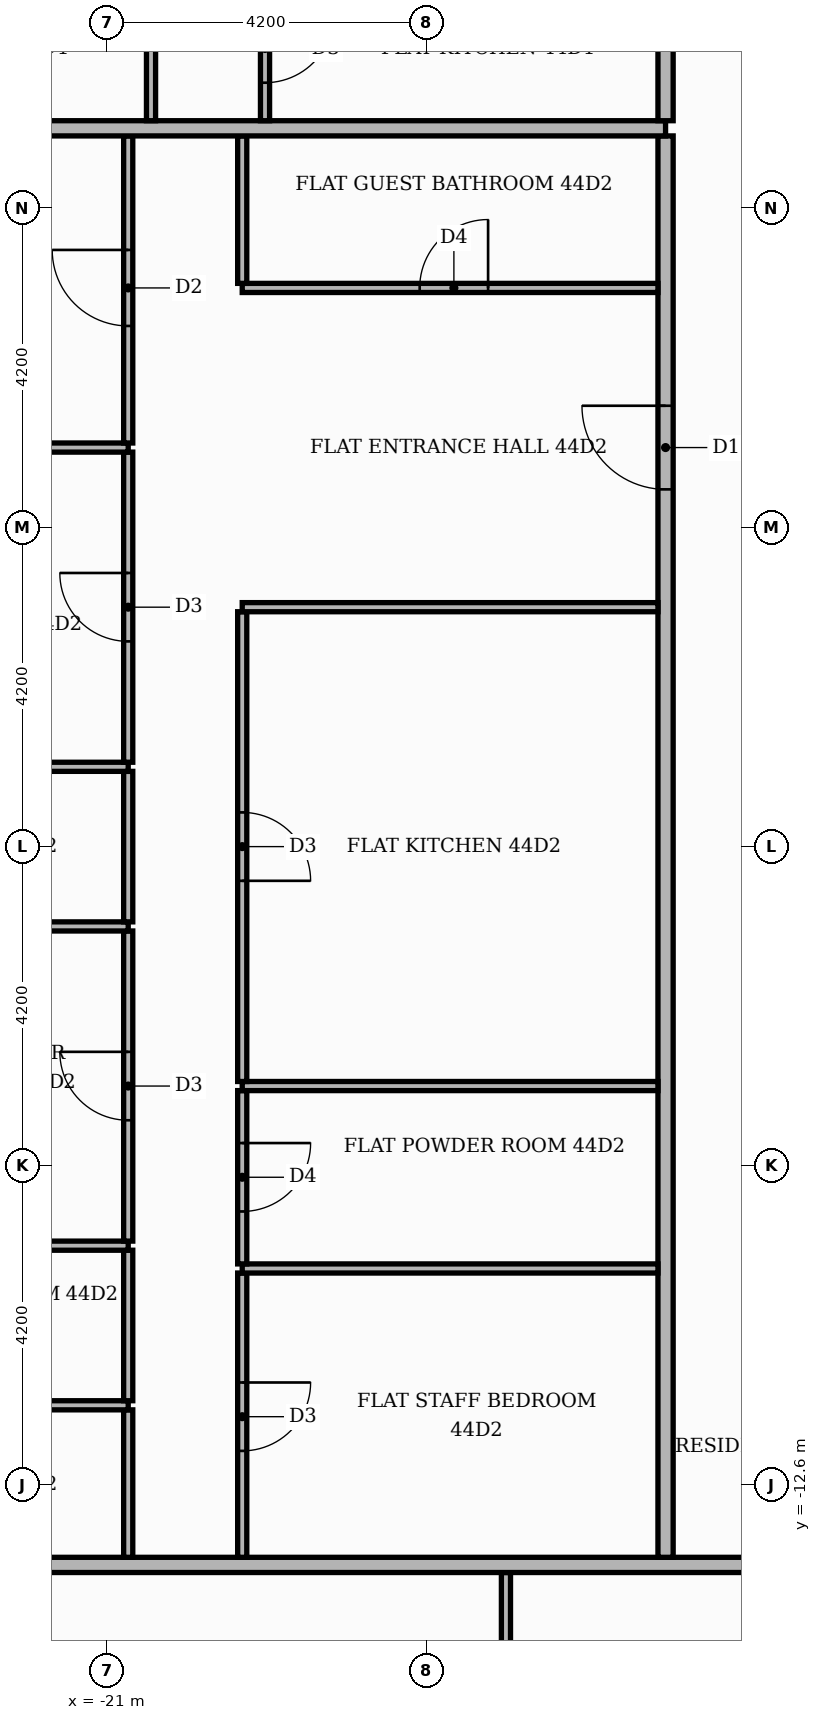
"""IFC4 building model, lengths in metres.
Left out: names, types, materials, properties, quantities, classifications, styles, units other than length and angle.
Written with IfcOpenShell. Run it as: python <this file> out.ifc"""

import sys

from ifc_helpers import new_model, si_unit, direction, frame, frame_2d, origin, place, context, subcontext, project, spatial, rectangle, extrude, element, fill, save


model = new_model("IFC4")
c1 = context("Model", 3, precision=1e-05, world=origin(), true_north=direction((0.0, 1.0)))
c2 = subcontext(c1, "Body", "Model", "MODEL_VIEW")
j1 = project(units=[si_unit("LENGTHUNIT", "METRE"), si_unit("PLANEANGLEUNIT", "RADIAN")], contexts=[c1])
p1 = place(None, origin())
s1 = spatial("IfcSite", under=j1, at=p1, CompositionType="ELEMENT")
p2 = place(p1, origin())
s2 = spatial("IfcBuilding", under=s1, at=p2, CompositionType="ELEMENT")
p3 = place(p2, frame((0.0, 0.0, 188.4)))
s3 = spatial("IfcBuildingStorey", under=s2, at=p3, CompositionType="ELEMENT", Elevation=188.4)
p4 = place(p3, frame((-15.75, -20.06, 0.0), z_axis=(0.0, 0.0, 1.0), x_axis=(0.0, 1.0, 0.0)))
e1 = element("IfcWall", 1, at=p4, inside=s3, PredefinedType="PARTITIONING", context=c2, shape_type="SweptSolid", body=[
    extrude(rectangle(XDim=6.31, YDim=0.12, at=frame_2d((3.155, 0.0))), origin(), (0.0, 0.0, 1.0), 3.48),
])
p5 = place(p4, frame((2.675, 0.0, 0.0)))
e2 = element("IfcOpeningElement", 2, at=p5, cuts=e1, PredefinedType="OPENING", context=c2, shape_type="SweptSolid", body=[
    extrude(rectangle(XDim=1.0, YDim=2.1, at=frame_2d((0.5, 1.05))), frame((0.0, 0.07, 0.0), z_axis=(0.0, -1.0, 0.0), x_axis=(1.0, 0.0, 0.0)), (0.0, 0.0, 1.0), 0.14),
])
p6 = place(p3, frame((-25.42, -13.65, 0.0), z_axis=(0.0, 0.0, 1.0), x_axis=(1.0, 0.0, 0.0)))
e3 = element("IfcWall", 3, at=p6, inside=s3, PredefinedType="PARTITIONING", context=c2, shape_type="SweptSolid", body=[
    extrude(rectangle(XDim=39.07, YDim=0.2, at=frame_2d((19.535, 0.0))), origin(), (0.0, 0.0, 1.0), 3.48),
])
p7 = place(p6, frame((13.32, 0.0, 0.0)))
e4 = element("IfcOpeningElement", 4, at=p7, cuts=e3, PredefinedType="OPENING", context=c2, shape_type="SweptSolid", body=[
    extrude(rectangle(XDim=1.1, YDim=2.4, at=frame_2d((0.55, 1.2))), frame((0.0, 0.11, 0.0), z_axis=(0.0, -1.0, 0.0), x_axis=(1.0, 0.0, 0.0)), (0.0, 0.0, 1.0), 0.22),
])
p8 = place(p6, frame((21.72, 0.0, 0.0)))
e5 = element("IfcOpeningElement", 5, at=p8, cuts=e3, PredefinedType="OPENING", context=c2, shape_type="SweptSolid", body=[
    extrude(rectangle(XDim=1.1, YDim=2.4, at=frame_2d((0.55, 1.2))), frame((0.0, 0.11, 0.0), z_axis=(0.0, -1.0, 0.0), x_axis=(1.0, 0.0, 0.0)), (0.0, 0.0, 1.0), 0.22),
])
p9 = place(p3, frame((-20.72, -13.55, 0.0), z_axis=(0.0, 0.0, 1.0), x_axis=(0.0, 1.0, 0.0)))
e6 = element("IfcWall", 6, at=p9, inside=s3, PredefinedType="PARTITIONING", context=c2, shape_type="SweptSolid", body=[
    extrude(rectangle(XDim=1.94, YDim=0.12, at=frame_2d((0.97, 0.0))), origin(), (0.0, 0.0, 1.0), 3.48),
])
p10 = place(p3, frame((-19.22, -13.55, 0.0), z_axis=(0.0, 0.0, 1.0), x_axis=(0.0, 1.0, 0.0)))
e7 = element("IfcWall", 7, at=p10, inside=s3, PredefinedType="PARTITIONING", context=c2, shape_type="SweptSolid", body=[
    extrude(rectangle(XDim=3.74, YDim=0.12, at=frame_2d((1.87, 0.0))), origin(), (0.0, 0.0, 1.0), 3.48),
])
p11 = place(p10, frame((1.4, 0.0, 0.0)))
e8 = element("IfcOpeningElement", 8, at=p11, cuts=e7, PredefinedType="OPENING", context=c2, shape_type="SweptSolid", body=[
    extrude(rectangle(XDim=0.9, YDim=2.1, at=frame_2d((0.45, 1.05))), frame((0.0, 0.07, 0.0), z_axis=(0.0, -1.0, 0.0), x_axis=(1.0, 0.0, 0.0)), (0.0, 0.0, 1.0), 0.14),
])
p12 = place(p3, frame((-13.65, -13.55, 0.0), z_axis=(0.0, 0.0, 1.0), x_axis=(0.0, 1.0, 0.0)))
e9 = element("IfcWall", 9, at=p12, inside=s3, PredefinedType="PARTITIONING", context=c2, shape_type="SweptSolid", body=[
    extrude(rectangle(XDim=18.7, YDim=0.2, at=frame_2d((9.35, 0.0))), origin(), (0.0, 0.0, 1.0), 3.48),
])
p13 = place(p12, frame((14.05, 0.0, 0.0)))
e10 = element("IfcOpeningElement", 10, at=p13, cuts=e9, PredefinedType="OPENING", context=c2, shape_type="SweptSolid", body=[
    extrude(rectangle(XDim=1.1, YDim=2.4, at=frame_2d((0.55, 1.2))), frame((0.0, 0.11, 0.0), z_axis=(0.0, -1.0, 0.0), x_axis=(1.0, 0.0, 0.0)), (0.0, 0.0, 1.0), 0.22),
])
p14 = place(p3, frame((-25.42, -11.55, 0.0), z_axis=(0.0, 0.0, 1.0), x_axis=(1.0, 0.0, 0.0)))
e11 = element("IfcWall", 11, at=p14, inside=s3, PredefinedType="PARTITIONING", context=c2, shape_type="SweptSolid", body=[
    extrude(rectangle(XDim=4.7, YDim=0.12, at=frame_2d((2.35, 0.0))), origin(), (0.0, 0.0, 1.0), 3.48),
])
p15 = place(p14, frame((1.75, 0.0, 0.0)))
e12 = element("IfcOpeningElement", 12, at=p15, cuts=e11, PredefinedType="OPENING", context=c2, shape_type="SweptSolid", body=[
    extrude(rectangle(XDim=0.9, YDim=2.1, at=frame_2d((0.45, 1.05))), frame((0.0, 0.07, 0.0), z_axis=(0.0, -1.0, 0.0), x_axis=(1.0, 0.0, 0.0)), (0.0, 0.0, 1.0), 0.14),
])
p16 = place(p3, frame((-20.72, -11.49, 0.0), z_axis=(0.0, 0.0, 1.0), x_axis=(0.0, 1.0, 0.0)))
e13 = element("IfcWall", 13, at=p16, inside=s3, PredefinedType="PARTITIONING", context=c2, shape_type="SweptSolid", body=[
    extrude(rectangle(XDim=1.98, YDim=0.12, at=frame_2d((0.99, 0.0))), origin(), (0.0, 0.0, 1.0), 3.48),
])
p17 = place(p3, frame((-19.22, -9.75, 0.0), z_axis=(0.0, 0.0, 1.0), x_axis=(1.0, 0.0, 0.0)))
e14 = element("IfcWall", 14, at=p17, inside=s3, PredefinedType="PARTITIONING", context=c2, shape_type="SweptSolid", body=[
    extrude(rectangle(XDim=5.47, YDim=0.12, at=frame_2d((2.735, 0.0))), origin(), (0.0, 0.0, 1.0), 3.48),
])
p18 = place(p3, frame((-19.22, -9.69, 0.0), z_axis=(0.0, 0.0, 1.0), x_axis=(0.0, 1.0, 0.0)))
e15 = element("IfcWall", 15, at=p18, inside=s3, PredefinedType="PARTITIONING", context=c2, shape_type="SweptSolid", body=[
    extrude(rectangle(XDim=2.28, YDim=0.12, at=frame_2d((1.14, 0.0))), origin(), (0.0, 0.0, 1.0), 3.48),
])
p19 = place(p18, frame((0.69, 0.0, 0.0)))
e16 = element("IfcOpeningElement", 16, at=p19, cuts=e15, PredefinedType="OPENING", context=c2, shape_type="SweptSolid", body=[
    extrude(rectangle(XDim=0.9, YDim=2.1, at=frame_2d((0.45, 1.05))), frame((0.0, 0.07, 0.0), z_axis=(0.0, -1.0, 0.0), x_axis=(1.0, 0.0, 0.0)), (0.0, 0.0, 1.0), 0.14),
])
p20 = place(p3, frame((-25.42, -9.45, 0.0), z_axis=(0.0, 0.0, 1.0), x_axis=(1.0, 0.0, 0.0)))
e17 = element("IfcWall", 17, at=p20, inside=s3, PredefinedType="PARTITIONING", context=c2, shape_type="SweptSolid", body=[
    extrude(rectangle(XDim=4.7, YDim=0.12, at=frame_2d((2.35, 0.0))), origin(), (0.0, 0.0, 1.0), 3.48),
])
p21 = place(p20, frame((1.75, 0.0, 0.0)))
e18 = element("IfcOpeningElement", 18, at=p21, cuts=e17, PredefinedType="OPENING", context=c2, shape_type="SweptSolid", body=[
    extrude(rectangle(XDim=0.9, YDim=2.1, at=frame_2d((0.45, 1.05))), frame((0.0, 0.07, 0.0), z_axis=(0.0, -1.0, 0.0), x_axis=(1.0, 0.0, 0.0)), (0.0, 0.0, 1.0), 0.14),
])
p22 = place(p3, frame((-20.72, -9.39, 0.0), z_axis=(0.0, 0.0, 1.0), x_axis=(0.0, 1.0, 0.0)))
e19 = element("IfcWall", 19, at=p22, inside=s3, PredefinedType="PARTITIONING", context=c2, shape_type="SweptSolid", body=[
    extrude(rectangle(XDim=4.08, YDim=0.12, at=frame_2d((2.04, 0.0))), origin(), (0.0, 0.0, 1.0), 3.48),
])
p23 = place(p22, frame((1.59, 0.0, 0.0)))
e20 = element("IfcOpeningElement", 20, at=p23, cuts=e19, PredefinedType="OPENING", context=c2, shape_type="SweptSolid", body=[
    extrude(rectangle(XDim=0.9, YDim=2.1, at=frame_2d((0.45, 1.05))), frame((0.0, 0.07, 0.0), z_axis=(0.0, -1.0, 0.0), x_axis=(1.0, 0.0, 0.0)), (0.0, 0.0, 1.0), 0.14),
])
p24 = place(p3, frame((-19.22, -7.35, 0.0), z_axis=(0.0, 0.0, 1.0), x_axis=(1.0, 0.0, 0.0)))
e21 = element("IfcWall", 21, at=p24, inside=s3, PredefinedType="PARTITIONING", context=c2, shape_type="SweptSolid", body=[
    extrude(rectangle(XDim=5.47, YDim=0.12, at=frame_2d((2.735, 0.0))), origin(), (0.0, 0.0, 1.0), 3.48),
])
p25 = place(p3, frame((-19.22, -7.29, 0.0), z_axis=(0.0, 0.0, 1.0), x_axis=(0.0, 1.0, 0.0)))
e22 = element("IfcWall", 22, at=p25, inside=s3, PredefinedType="PARTITIONING", context=c2, shape_type="SweptSolid", body=[
    extrude(rectangle(XDim=6.18, YDim=0.12, at=frame_2d((3.09, 0.0))), origin(), (0.0, 0.0, 1.0), 3.48),
])
p26 = place(p25, frame((2.64, 0.0, 0.0)))
e23 = element("IfcOpeningElement", 23, at=p26, cuts=e22, PredefinedType="OPENING", context=c2, shape_type="SweptSolid", body=[
    extrude(rectangle(XDim=0.9, YDim=2.1, at=frame_2d((0.45, 1.05))), frame((0.0, 0.07, 0.0), z_axis=(0.0, -1.0, 0.0), x_axis=(1.0, 0.0, 0.0)), (0.0, 0.0, 1.0), 0.14),
])
p27 = place(p3, frame((-25.42, -5.25, 0.0), z_axis=(0.0, 0.0, 1.0), x_axis=(1.0, 0.0, 0.0)))
e24 = element("IfcWall", 24, at=p27, inside=s3, PredefinedType="PARTITIONING", context=c2, shape_type="SweptSolid", body=[
    extrude(rectangle(XDim=4.7, YDim=0.12, at=frame_2d((2.35, 0.0))), origin(), (0.0, 0.0, 1.0), 3.48),
])
p28 = place(p3, frame((-20.72, -5.19, 0.0), z_axis=(0.0, 0.0, 1.0), x_axis=(0.0, 1.0, 0.0)))
e25 = element("IfcWall", 25, at=p28, inside=s3, PredefinedType="PARTITIONING", context=c2, shape_type="SweptSolid", body=[
    extrude(rectangle(XDim=1.98, YDim=0.12, at=frame_2d((0.99, 0.0))), origin(), (0.0, 0.0, 1.0), 3.48),
])
p29 = place(p3, frame((-25.42, -3.15, 0.0), z_axis=(0.0, 0.0, 1.0), x_axis=(1.0, 0.0, 0.0)))
e26 = element("IfcWall", 26, at=p29, inside=s3, PredefinedType="PARTITIONING", context=c2, shape_type="SweptSolid", body=[
    extrude(rectangle(XDim=4.7, YDim=0.12, at=frame_2d((2.35, 0.0))), origin(), (0.0, 0.0, 1.0), 3.48),
])
p30 = place(p29, frame((1.75, 0.0, 0.0)))
e27 = element("IfcOpeningElement", 27, at=p30, cuts=e26, PredefinedType="OPENING", context=c2, shape_type="SweptSolid", body=[
    extrude(rectangle(XDim=0.9, YDim=2.1, at=frame_2d((0.45, 1.05))), frame((0.0, 0.07, 0.0), z_axis=(0.0, -1.0, 0.0), x_axis=(1.0, 0.0, 0.0)), (0.0, 0.0, 1.0), 0.14),
])
p31 = place(p3, frame((-20.72, -3.09, 0.0), z_axis=(0.0, 0.0, 1.0), x_axis=(0.0, 1.0, 0.0)))
e28 = element("IfcWall", 28, at=p31, inside=s3, PredefinedType="PARTITIONING", context=c2, shape_type="SweptSolid", body=[
    extrude(rectangle(XDim=4.08, YDim=0.12, at=frame_2d((2.04, 0.0))), origin(), (0.0, 0.0, 1.0), 3.48),
])
p32 = place(p31, frame((1.59, 0.0, 0.0)))
e29 = element("IfcOpeningElement", 29, at=p32, cuts=e28, PredefinedType="OPENING", context=c2, shape_type="SweptSolid", body=[
    extrude(rectangle(XDim=0.9, YDim=2.1, at=frame_2d((0.45, 1.05))), frame((0.0, 0.07, 0.0), z_axis=(0.0, -1.0, 0.0), x_axis=(1.0, 0.0, 0.0)), (0.0, 0.0, 1.0), 0.14),
])
p33 = place(p3, frame((-19.22, -1.05, 0.0), z_axis=(0.0, 0.0, 1.0), x_axis=(1.0, 0.0, 0.0)))
e30 = element("IfcWall", 30, at=p33, inside=s3, PredefinedType="PARTITIONING", context=c2, shape_type="SweptSolid", body=[
    extrude(rectangle(XDim=5.47, YDim=0.12, at=frame_2d((2.735, 0.0))), origin(), (0.0, 0.0, 1.0), 3.48),
])
p34 = place(p3, frame((-25.42, 1.05, 0.0), z_axis=(0.0, 0.0, 1.0), x_axis=(1.0, 0.0, 0.0)))
e31 = element("IfcWall", 31, at=p34, inside=s3, PredefinedType="PARTITIONING", context=c2, shape_type="SweptSolid", body=[
    extrude(rectangle(XDim=4.7, YDim=0.12, at=frame_2d((2.35, 0.0))), origin(), (0.0, 0.0, 1.0), 3.48),
])
p35 = place(p3, frame((-20.72, 1.11, 0.0), z_axis=(0.0, 0.0, 1.0), x_axis=(0.0, 1.0, 0.0)))
e32 = element("IfcWall", 32, at=p35, inside=s3, PredefinedType="PARTITIONING", context=c2, shape_type="SweptSolid", body=[
    extrude(rectangle(XDim=4.04, YDim=0.12, at=frame_2d((2.02, 0.0))), origin(), (0.0, 0.0, 1.0), 3.48),
])
p36 = place(p35, frame((1.54, 0.0, 0.0)))
e33 = element("IfcOpeningElement", 33, at=p36, cuts=e32, PredefinedType="OPENING", context=c2, shape_type="SweptSolid", body=[
    extrude(rectangle(XDim=1.0, YDim=2.1, at=frame_2d((0.5, 1.05))), frame((0.0, 0.07, 0.0), z_axis=(0.0, -1.0, 0.0), x_axis=(1.0, 0.0, 0.0)), (0.0, 0.0, 1.0), 0.14),
])
p37 = place(p3, frame((-19.22, 3.15, 0.0), z_axis=(0.0, 0.0, 1.0), x_axis=(1.0, 0.0, 0.0)))
e34 = element("IfcWall", 34, at=p37, inside=s3, PredefinedType="PARTITIONING", context=c2, shape_type="SweptSolid", body=[
    extrude(rectangle(XDim=5.47, YDim=0.12, at=frame_2d((2.735, 0.0))), origin(), (0.0, 0.0, 1.0), 3.48),
])
p38 = place(p37, frame((2.335, 0.0, 0.0)))
e35 = element("IfcOpeningElement", 35, at=p38, cuts=e34, PredefinedType="OPENING", context=c2, shape_type="SweptSolid", body=[
    extrude(rectangle(XDim=0.9, YDim=2.1, at=frame_2d((0.45, 1.05))), frame((0.0, 0.07, 0.0), z_axis=(0.0, -1.0, 0.0), x_axis=(1.0, 0.0, 0.0)), (0.0, 0.0, 1.0), 0.14),
])
p39 = place(p3, frame((-19.22, 3.21, 0.0), z_axis=(0.0, 0.0, 1.0), x_axis=(0.0, 1.0, 0.0)))
e36 = element("IfcWall", 36, at=p39, inside=s3, PredefinedType="PARTITIONING", context=c2, shape_type="SweptSolid", body=[
    extrude(rectangle(XDim=1.94, YDim=0.12, at=frame_2d((0.97, 0.0))), origin(), (0.0, 0.0, 1.0), 3.48),
])
p40 = place(p3, frame((-25.42, 5.25, 0.0), z_axis=(0.0, 0.0, 1.0), x_axis=(1.0, 0.0, 0.0)))
e37 = element("IfcWall", 37, at=p40, inside=s3, PredefinedType="PARTITIONING", context=c2, shape_type="SweptSolid", body=[
    extrude(rectangle(XDim=11.77, YDim=0.2, at=frame_2d((5.885, 0.0))), origin(), (0.0, 0.0, 1.0), 3.48),
])
p41 = place(p3, frame((-20.42, 5.35, 0.0), z_axis=(0.0, 0.0, 1.0), x_axis=(0.0, 1.0, 0.0)))
e38 = element("IfcWall", 38, at=p41, inside=s3, PredefinedType="PARTITIONING", context=c2, shape_type="SweptSolid", body=[
    extrude(rectangle(XDim=1.94, YDim=0.12, at=frame_2d((0.97, 0.0))), origin(), (0.0, 0.0, 1.0), 3.48),
])
p42 = place(p3, frame((-18.92, 5.35, 0.0), z_axis=(0.0, 0.0, 1.0), x_axis=(0.0, 1.0, 0.0)))
e39 = element("IfcWall", 39, at=p42, inside=s3, PredefinedType="PARTITIONING", context=c2, shape_type="SweptSolid", body=[
    extrude(rectangle(XDim=1.94, YDim=0.12, at=frame_2d((0.97, 0.0))), origin(), (0.0, 0.0, 1.0), 3.48),
])
p43 = place(p42, frame((0.5, 0.0, 0.0)))
e40 = element("IfcOpeningElement", 40, at=p43, cuts=e39, PredefinedType="OPENING", context=c2, shape_type="SweptSolid", body=[
    extrude(rectangle(XDim=0.9, YDim=2.1, at=frame_2d((0.45, 1.05))), frame((0.0, 0.07, 0.0), z_axis=(0.0, -1.0, 0.0), x_axis=(1.0, 0.0, 0.0)), (0.0, 0.0, 1.0), 0.14),
])
p44 = place(p3, frame((-13.65, 5.35, 0.0), z_axis=(0.0, 0.0, 1.0), x_axis=(0.0, 1.0, 0.0)))
e41 = element("IfcWall", 41, at=p44, inside=s3, PredefinedType="PARTITIONING", context=c2, shape_type="SweptSolid", body=[
    extrude(rectangle(XDim=8.2, YDim=0.2, at=frame_2d((4.1, 0.0))), origin(), (0.0, 0.0, 1.0), 3.48),
])
p45 = place(p44, frame((5.65, 0.0, 0.0)))
e42 = element("IfcOpeningElement", 42, at=p45, cuts=e41, PredefinedType="OPENING", context=c2, shape_type="SweptSolid", body=[
    extrude(rectangle(XDim=1.1, YDim=2.4, at=frame_2d((0.55, 1.2))), frame((0.0, 0.11, 0.0), z_axis=(0.0, -1.0, 0.0), x_axis=(1.0, 0.0, 0.0)), (0.0, 0.0, 1.0), 0.22),
])
p46 = place(p43, frame((0.9, 0.0, 0.0), z_axis=(0.0, 0.0, 1.0), x_axis=(-1.0, 0.0, 0.0)))
e43 = element("IfcDoor", 43, at=p46, inside=s3, OperationType="SINGLE_SWING_RIGHT", PredefinedType="DOOR", context=c2, shape_type="SweptSolid", body=[
    extrude(rectangle(XDim=0.9, YDim=2.1, at=frame_2d((0.45, 1.05))), frame((0.0, 0.025, 0.0), z_axis=(0.0, -1.0, 0.0), x_axis=(1.0, 0.0, 0.0)), (0.0, 0.0, 1.0), 0.05),
])
fill(e40, e43)
p47 = place(p13, origin())
e44 = element("IfcDoor", 44, at=p47, inside=s3, OperationType="SINGLE_SWING_RIGHT", PredefinedType="DOOR", context=c2, shape_type="SweptSolid", body=[
    extrude(rectangle(XDim=1.1, YDim=2.4, at=frame_2d((0.55, 1.2))), frame((0.0, 0.025, 0.0), z_axis=(0.0, -1.0, 0.0), x_axis=(1.0, 0.0, 0.0)), (0.0, 0.0, 1.0), 0.05),
])
fill(e10, e44)
p48 = place(p38, origin())
e45 = element("IfcDoor", 45, at=p48, inside=s3, OperationType="SINGLE_SWING_RIGHT", PredefinedType="DOOR", context=c2, shape_type="SweptSolid", body=[
    extrude(rectangle(XDim=0.9, YDim=2.1, at=frame_2d((0.45, 1.05))), frame((0.0, 0.025, 0.0), z_axis=(0.0, -1.0, 0.0), x_axis=(1.0, 0.0, 0.0)), (0.0, 0.0, 1.0), 0.05),
])
fill(e35, e45)
p49 = place(p26, frame((0.9, 0.0, 0.0), z_axis=(0.0, 0.0, 1.0), x_axis=(-1.0, 0.0, 0.0)))
e46 = element("IfcDoor", 46, at=p49, inside=s3, OperationType="SINGLE_SWING_LEFT", PredefinedType="DOOR", context=c2, shape_type="SweptSolid", body=[
    extrude(rectangle(XDim=0.9, YDim=2.1, at=frame_2d((0.45, 1.05))), frame((0.0, 0.025, 0.0), z_axis=(0.0, -1.0, 0.0), x_axis=(1.0, 0.0, 0.0)), (0.0, 0.0, 1.0), 0.05),
])
fill(e23, e46)
p50 = place(p19, frame((0.9, 0.0, 0.0), z_axis=(0.0, 0.0, 1.0), x_axis=(-1.0, 0.0, 0.0)))
e47 = element("IfcDoor", 47, at=p50, inside=s3, OperationType="SINGLE_SWING_RIGHT", PredefinedType="DOOR", context=c2, shape_type="SweptSolid", body=[
    extrude(rectangle(XDim=0.9, YDim=2.1, at=frame_2d((0.45, 1.05))), frame((0.0, 0.025, 0.0), z_axis=(0.0, -1.0, 0.0), x_axis=(1.0, 0.0, 0.0)), (0.0, 0.0, 1.0), 0.05),
])
fill(e16, e47)
p51 = place(p11, frame((0.9, 0.0, 0.0), z_axis=(0.0, 0.0, 1.0), x_axis=(-1.0, 0.0, 0.0)))
e48 = element("IfcDoor", 48, at=p51, inside=s3, OperationType="SINGLE_SWING_RIGHT", PredefinedType="DOOR", context=c2, shape_type="SweptSolid", body=[
    extrude(rectangle(XDim=0.9, YDim=2.1, at=frame_2d((0.45, 1.05))), frame((0.0, 0.025, 0.0), z_axis=(0.0, -1.0, 0.0), x_axis=(1.0, 0.0, 0.0)), (0.0, 0.0, 1.0), 0.05),
])
fill(e8, e48)
p52 = place(p36, origin())
e49 = element("IfcDoor", 49, at=p52, inside=s3, OperationType="SINGLE_SWING_RIGHT", PredefinedType="DOOR", context=c2, shape_type="SweptSolid", body=[
    extrude(rectangle(XDim=1.0, YDim=2.1, at=frame_2d((0.5, 1.05))), frame((0.0, 0.025, 0.0), z_axis=(0.0, -1.0, 0.0), x_axis=(1.0, 0.0, 0.0)), (0.0, 0.0, 1.0), 0.05),
])
fill(e33, e49)
p53 = place(p32, origin())
e50 = element("IfcDoor", 50, at=p53, inside=s3, OperationType="SINGLE_SWING_RIGHT", PredefinedType="DOOR", context=c2, shape_type="SweptSolid", body=[
    extrude(rectangle(XDim=0.9, YDim=2.1, at=frame_2d((0.45, 1.05))), frame((0.0, 0.025, 0.0), z_axis=(0.0, -1.0, 0.0), x_axis=(1.0, 0.0, 0.0)), (0.0, 0.0, 1.0), 0.05),
])
fill(e29, e50)
p54 = place(p23, origin())
e51 = element("IfcDoor", 51, at=p54, inside=s3, OperationType="SINGLE_SWING_RIGHT", PredefinedType="DOOR", context=c2, shape_type="SweptSolid", body=[
    extrude(rectangle(XDim=0.9, YDim=2.1, at=frame_2d((0.45, 1.05))), frame((0.0, 0.025, 0.0), z_axis=(0.0, -1.0, 0.0), x_axis=(1.0, 0.0, 0.0)), (0.0, 0.0, 1.0), 0.05),
])
fill(e20, e51)
save(model, sys.argv[1])
